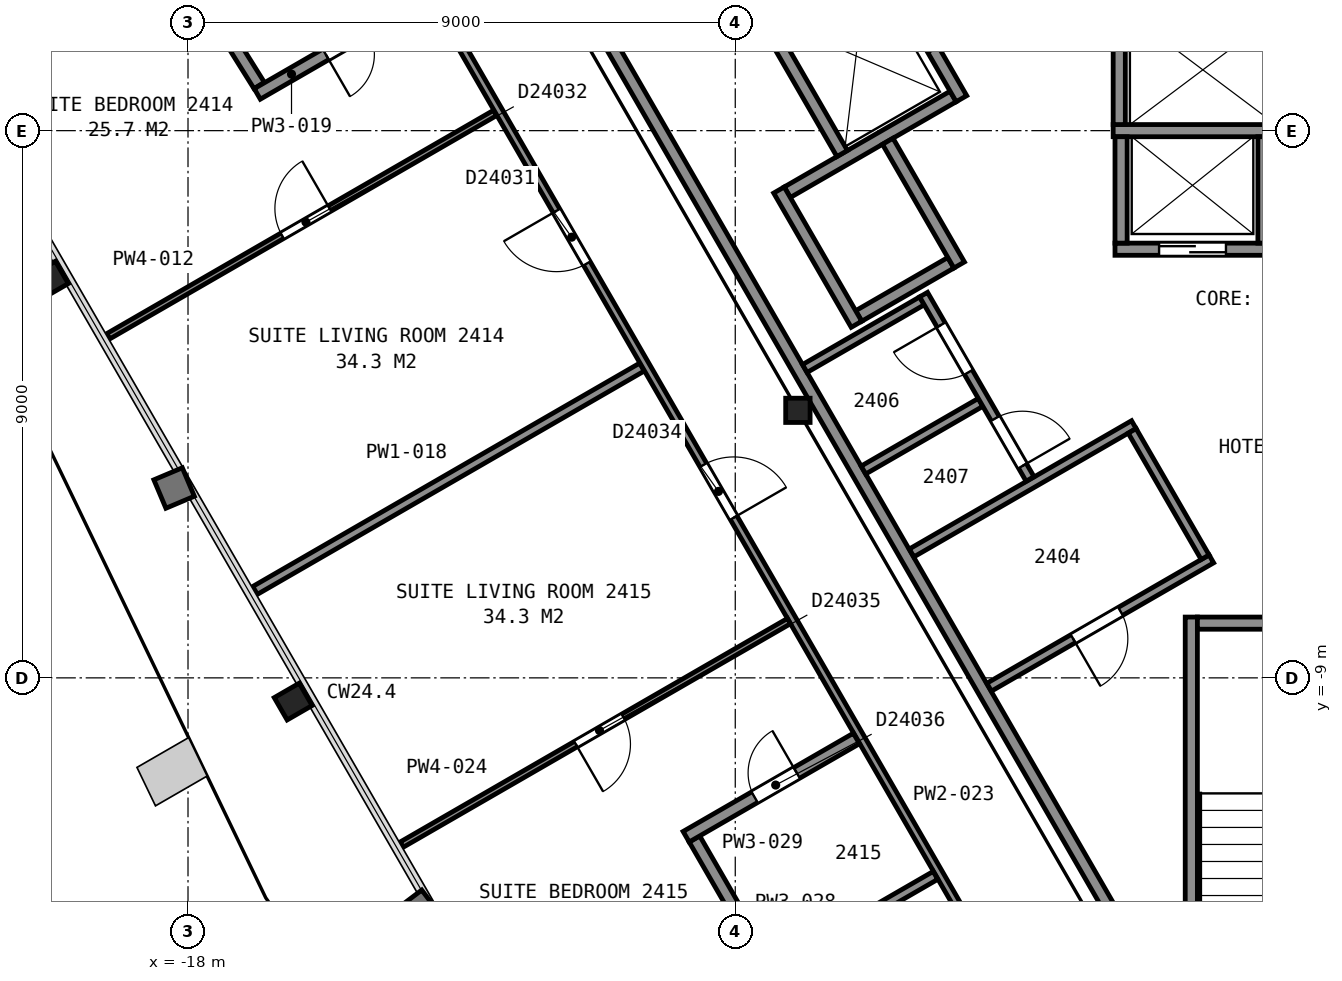
"""IFC4 building model, lengths in metres.
Left out: names, types, materials, properties, quantities, classifications, styles, units other than length and angle.
Written with IfcOpenShell. Run it as: python <this file> out.ifc"""

import sys

from ifc_helpers import new_model, si_unit, direction, frame, frame_2d, origin, origin_2d, place, context, subcontext, project, spatial, rectangle, i_section, extrude, element, fill, save


model = new_model("IFC4")
c1 = context("Model", 3, precision=1e-05, world=origin(), true_north=direction((0.0, 1.0)))
c2 = subcontext(c1, "Body", "Model", "MODEL_VIEW")
j1 = project(units=[si_unit("LENGTHUNIT", "METRE"), si_unit("PLANEANGLEUNIT", "RADIAN")], contexts=[c1])
p1 = place(None, origin())
s1 = spatial("IfcSite", under=j1, at=p1, CompositionType="ELEMENT")
p2 = place(p1, origin())
s2 = spatial("IfcBuilding", under=s1, at=p2, CompositionType="ELEMENT")
p3 = place(p2, frame((0.0, 0.0, 103.6)))
s3 = spatial("IfcBuildingStorey", under=s2, at=p3, CompositionType="ELEMENT", Elevation=103.6)
p4 = place(p3, frame((-20.28, -2.45, 0.04), z_axis=(0.0, 0.0, 1.0), x_axis=(-0.5, 0.866025403784, 0.0)))
e1 = element("IfcColumn", 1, at=p4, inside=s3, PredefinedType="COLUMN", context=c2, shape_type="SweptSolid", body=[
    extrude(i_section(OverallWidth=0.424, OverallDepth=0.475, WebThickness=0.048, FlangeThickness=0.077, FilletRadius=0.015, at=origin_2d()), origin(), (0.0, 0.0, 1.0), 3.56),
])
p5 = place(p3, frame((-16.27, -9.39, 0.035), z_axis=(0.0, 0.0, 1.0), x_axis=(-0.5, 0.866025403784, 0.0)))
e2 = element("IfcColumn", 2, at=p5, inside=s3, PredefinedType="COLUMN", context=c2, shape_type="SweptSolid", body=[
    extrude(i_section(OverallWidth=0.424, OverallDepth=0.475, WebThickness=0.048, FlangeThickness=0.077, FilletRadius=0.015, at=origin_2d()), origin(), (0.0, 0.0, 1.0), 3.565),
])
p6 = place(p3, frame((-7.97, -4.6, 0.0), z_axis=(0.0, 0.0, 1.0), x_axis=(1.0, 0.0, 0.0)))
e3 = element("IfcColumn", 3, at=p6, inside=s3, PredefinedType="COLUMN", context=c2, shape_type="SweptSolid", body=[
    extrude(i_section(OverallWidth=0.401, OverallDepth=0.399, WebThickness=0.025, FlangeThickness=0.04, FilletRadius=0.015, at=origin_2d()), origin(), (0.0, 0.0, 1.0), 3.6),
])
p7 = place(p3, frame((-1.5, -8.0, 0.0), z_axis=(0.0, 0.0, 1.0), x_axis=(0.0, -1.0, 0.0)))
e4 = element("IfcWall", 4, at=p7, inside=s3, PredefinedType="PARTITIONING", context=c2, shape_type="SweptSolid", body=[
    extrude(rectangle(XDim=12.0, YDim=0.2, at=frame_2d((6.0, 0.0))), origin(), (0.0, 0.0, 1.0), 3.35),
])
p8 = place(p3, frame((-1.4, -8.1, 0.0), z_axis=(0.0, 0.0, 1.0), x_axis=(1.0, 0.0, 0.0)))
e5 = element("IfcWall", 5, at=p8, inside=s3, PredefinedType="PARTITIONING", context=c2, shape_type="SweptSolid", body=[
    extrude(rectangle(XDim=2.8, YDim=0.2, at=frame_2d((1.4, 0.0))), origin(), (0.0, 0.0, 1.0), 3.35),
])
p9 = place(p3, frame((-2.755, -1.95, 0.0), z_axis=(0.0, 0.0, 1.0), x_axis=(1.0, 0.0, 0.0)))
e6 = element("IfcWall", 6, at=p9, inside=s3, PredefinedType="PARTITIONING", context=c2, shape_type="SweptSolid", body=[
    extrude(rectangle(XDim=2.55, YDim=0.2, at=frame_2d((1.275, 0.0))), origin(), (0.0, 0.0, 1.0), 3.6),
])
p10 = place(p9, frame((0.725, 0.0, 0.0)))
e7 = element("IfcOpeningElement", 7, at=p10, cuts=e6, PredefinedType="OPENING", context=c2, shape_type="SweptSolid", body=[
    extrude(rectangle(XDim=1.1, YDim=2.1, at=frame_2d((0.55, 1.05))), frame((0.0, 0.11, 0.0), z_axis=(0.0, -1.0, 0.0), x_axis=(1.0, 0.0, 0.0)), (0.0, 0.0, 1.0), 0.22),
])
p11 = place(p3, frame((-2.785, 0.0, 0.0), z_axis=(0.0, 0.0, 1.0), x_axis=(1.0, 0.0, 0.0)))
e8 = element("IfcWall", 8, at=p11, inside=s3, PredefinedType="PARTITIONING", context=c2, shape_type="SweptSolid", body=[
    extrude(rectangle(XDim=2.95, YDim=0.2, at=frame_2d((1.475, 0.0))), origin(), (0.0, 0.0, 1.0), 3.6),
])
p12 = place(p3, frame((-6.97, -3.048, 0.0), z_axis=(0.0, 0.0, 1.0), x_axis=(0.866036909293, 0.499980071345, 0.0)))
e9 = element("IfcWall", 9, at=p12, inside=s3, PredefinedType="PARTITIONING", context=c2, shape_type="SweptSolid", body=[
    extrude(rectangle(XDim=1.75, YDim=0.2, at=frame_2d((0.875, 0.0))), origin(), (0.0, 0.0, 1.0), 3.6),
])
p13 = place(p3, frame((-8.145, -1.013, 0.0), z_axis=(0.0, 0.0, 1.0), x_axis=(0.866016494683, 0.500015430699, 0.0)))
e10 = element("IfcWall", 10, at=p13, inside=s3, PredefinedType="PARTITIONING", context=c2, shape_type="SweptSolid", body=[
    extrude(rectangle(XDim=3.15, YDim=0.2, at=frame_2d((1.575, 0.0))), origin(), (0.0, 0.0, 1.0), 3.6),
])
for number, where, z_axis, x_axis in (
    (11, (-0.305, -1.85, 0.0), (0.0, 0.0, 1.0), (0.0, 1.0, 0.0)),
    (12, (-2.655, -1.85, 0.0), (0.0, 0.0, 1.0), (0.0, 1.0, 0.0)),
):
    element("IfcWall", number, at=place(p3, frame(where, z_axis=z_axis, x_axis=x_axis)), inside=s3, PredefinedType="PARTITIONING", context=c2, shape_type="SweptSolid", body=[
        extrude(rectangle(XDim=1.75, YDim=0.2, at=frame_2d((0.875, 0.0))), origin(), (0.0, 0.0, 1.0), 3.6),
    ])
p14 = place(p3, frame((-2.685, 0.1, 0.0), z_axis=(0.0, 0.0, 1.0), x_axis=(0.0, 1.0, 0.0)))
e13 = element("IfcWall", 13, at=p14, inside=s3, PredefinedType="PARTITIONING", context=c2, shape_type="SweptSolid", body=[
    extrude(rectangle(XDim=1.95, YDim=0.2, at=frame_2d((0.975, 0.0))), origin(), (0.0, 0.0, 1.0), 3.6),
])
p15 = place(p3, frame((-5.28, 0.525, 0.0), z_axis=(0.0, 0.0, 1.0), x_axis=(-0.500037662692, 0.866003658127, 0.0)))
e14 = element("IfcWall", 14, at=p15, inside=s3, PredefinedType="PARTITIONING", context=c2, shape_type="SweptSolid", body=[
    extrude(rectangle(XDim=2.95, YDim=0.2, at=frame_2d((1.475, 0.0))), origin(), (0.0, 0.0, 1.0), 3.6),
])
p16 = place(p15, frame((0.925, 0.0, 0.0)))
e15 = element("IfcOpeningElement", 15, at=p16, cuts=e14, PredefinedType="OPENING", context=c2, shape_type="SweptSolid", body=[
    extrude(rectangle(XDim=1.1, YDim=2.1, at=frame_2d((0.55, 1.05))), frame((0.0, 0.11, 0.0), z_axis=(0.0, -1.0, 0.0), x_axis=(1.0, 0.0, 0.0)), (0.0, 0.0, 1.0), 0.22),
])
p17 = place(p3, frame((-5.318, -2.21, 0.0), z_axis=(0.0, 0.0, 1.0), x_axis=(-0.499938297808, 0.866061024631, 0.0)))
e16 = element("IfcWall", 16, at=p17, inside=s3, PredefinedType="PARTITIONING", context=c2, shape_type="SweptSolid", body=[
    extrude(rectangle(XDim=2.35, YDim=0.2, at=frame_2d((1.175, 0.0))), origin(), (0.0, 0.0, 1.0), 3.6),
])
p18 = place(p3, frame((-7.242, -0.376, 0.0), z_axis=(0.0, 0.0, 1.0), x_axis=(-0.499996545922, 0.866027397988, 0.0)))
e17 = element("IfcWall", 17, at=p18, inside=s3, PredefinedType="PARTITIONING", context=c2, shape_type="SweptSolid", body=[
    extrude(rectangle(XDim=2.75, YDim=0.2, at=frame_2d((1.375, 0.0))), origin(), (0.0, 0.0, 1.0), 3.6),
])
p19 = place(p3, frame((-7.006, -3.185, 0.0), z_axis=(0.0, 0.0, 1.0), x_axis=(-0.499990435942, 0.866030925526, 0.0)))
e18 = element("IfcWall", 18, at=p19, inside=s3, PredefinedType="PARTITIONING", context=c2, shape_type="SweptSolid", body=[
    extrude(rectangle(XDim=2.55, YDim=0.2, at=frame_2d((1.275, 0.0))), origin(), (0.0, 0.0, 1.0), 3.6),
])
p20 = place(p3, frame((-13.664, 5.946, 0.0), z_axis=(0.0, 0.0, 1.0), x_axis=(0.499994327219, -0.866028678941, 0.0)))
e19 = element("IfcWall", 19, at=p20, inside=s3, PredefinedType="PARTITIONING", context=c2, shape_type="SweptSolid", body=[
    extrude(rectangle(XDim=23.968, YDim=0.2, at=frame_2d((11.984, 0.0))), origin(), (0.0, 0.0, 1.0), 3.35),
])
p21 = place(p3, frame((-7.856, -3.912, 0.0), z_axis=(0.0, 0.0, 1.0), x_axis=(0.865971748, 0.500092923031, 0.0)))
e20 = element("IfcWall", 20, at=p21, inside=s3, PredefinedType="PARTITIONING", context=c2, shape_type="SweptSolid", body=[
    extrude(rectangle(XDim=2.225, YDim=0.15, at=frame_2d((1.112, 0.0))), origin(), (0.0, 0.0, 1.0), 3.35),
])
p22 = place(p3, frame((-6.892, -5.582, 0.0), z_axis=(0.0, 0.0, 1.0), x_axis=(0.865944298464, 0.500140452231, 0.0)))
e21 = element("IfcWall", 21, at=p22, inside=s3, PredefinedType="PARTITIONING", context=c2, shape_type="SweptSolid", body=[
    extrude(rectangle(XDim=2.224, YDim=0.15, at=frame_2d((1.112, 0.0))), origin(), (0.0, 0.0, 1.0), 3.35),
])
p23 = place(p3, frame((-6.1, -6.946, 0.0), z_axis=(0.0, 0.0, 1.0), x_axis=(0.866038200431, 0.499977834903, 0.0)))
e22 = element("IfcWall", 22, at=p23, inside=s3, PredefinedType="PARTITIONING", context=c2, shape_type="SweptSolid", body=[
    extrude(rectangle(XDim=4.22, YDim=0.15, at=frame_2d((2.11, 0.0))), origin(), (0.0, 0.0, 1.0), 3.35),
])
p24 = place(p3, frame((-4.152, -5.729, 0.0), z_axis=(0.0, 0.0, 1.0), x_axis=(-0.500024287448, 0.866011380966, 0.0)))
e23 = element("IfcWall", 23, at=p24, inside=s3, PredefinedType="PARTITIONING", context=c2, shape_type="SweptSolid", body=[
    extrude(rectangle(XDim=3.501, YDim=0.15, at=frame_2d((1.75, 0.0))), origin(), (0.0, 0.0, 1.0), 3.35),
])
p25 = place(p24, frame((2.026, 0.0, 0.0)))
e24 = element("IfcOpeningElement", 24, at=p25, cuts=e23, PredefinedType="OPENING", context=c2, shape_type="SweptSolid", body=[
    extrude(rectangle(XDim=0.9, YDim=2.1, at=frame_2d((0.45, 1.05))), frame((0.0, 0.085, 0.0), z_axis=(0.0, -1.0, 0.0), x_axis=(1.0, 0.0, 0.0)), (0.0, 0.0, 1.0), 0.17),
])
p26 = place(p24, frame((0.248, 0.0, 0.0)))
e25 = element("IfcOpeningElement", 25, at=p26, cuts=e23, PredefinedType="OPENING", context=c2, shape_type="SweptSolid", body=[
    extrude(rectangle(XDim=0.9, YDim=2.1, at=frame_2d((0.45, 1.05))), frame((0.0, 0.085, 0.0), z_axis=(0.0, -1.0, 0.0), x_axis=(1.0, 0.0, 0.0)), (0.0, 0.0, 1.0), 0.17),
])
p27 = place(p3, frame((-4.825, -9.154, 0.0), z_axis=(0.0, 0.0, 1.0), x_axis=(0.866023738697, 0.500002884005, 0.0)))
e26 = element("IfcWall", 26, at=p27, inside=s3, PredefinedType="PARTITIONING", context=c2, shape_type="SweptSolid", body=[
    extrude(rectangle(XDim=4.22, YDim=0.15, at=frame_2d((2.11, 0.0))), origin(), (0.0, 0.0, 1.0), 3.35),
])
p28 = place(p27, frame((1.595, 0.0, 0.0)))
e27 = element("IfcOpeningElement", 27, at=p28, cuts=e26, PredefinedType="OPENING", context=c2, shape_type="SweptSolid", body=[
    extrude(rectangle(XDim=0.9, YDim=2.1, at=frame_2d((0.45, 1.05))), frame((0.0, 0.085, 0.0), z_axis=(0.0, -1.0, 0.0), x_axis=(1.0, 0.0, 0.0)), (0.0, 0.0, 1.0), 0.17),
])
p29 = place(p3, frame((-2.472, -4.938, 0.0), z_axis=(0.0, 0.0, 1.0), x_axis=(0.500045362686, -0.865999212041, 0.0)))
e28 = element("IfcWall", 28, at=p29, inside=s3, PredefinedType="PARTITIONING", context=c2, shape_type="SweptSolid", body=[
    extrude(rectangle(XDim=2.4, YDim=0.15, at=frame_2d((1.2, 0.0))), origin(), (0.0, 0.0, 1.0), 3.35),
])
p30 = place(p3, frame((-21.725, 0.798, 0.0), z_axis=(0.0, 0.0, 1.0), x_axis=(0.866003534372, 0.50003787702, 0.0)))
e29 = element("IfcWall", 29, at=p30, inside=s3, PredefinedType="PARTITIONING", context=c2, shape_type="SweptSolid", body=[
    extrude(rectangle(XDim=7.348, YDim=0.15, at=frame_2d((3.674, 0.0))), origin(), (0.0, 0.0, 1.0), 2.613),
])
p31 = place(p3, frame((-19.311, -3.382, 0.0), z_axis=(0.0, 0.0, 1.0), x_axis=(0.865995225926, 0.500052265941, 0.0)))
e30 = element("IfcWall", 30, at=p31, inside=s3, PredefinedType="PARTITIONING", context=c2, shape_type="SweptSolid", body=[
    extrude(rectangle(XDim=7.347, YDim=0.1, at=frame_2d((3.674, 0.0))), origin(), (0.0, 0.0, 1.0), 2.613),
])
p32 = place(p31, frame((3.303, 0.0, 0.0)))
e31 = element("IfcOpeningElement", 31, at=p32, cuts=e30, PredefinedType="OPENING", context=c2, shape_type="SweptSolid", body=[
    extrude(rectangle(XDim=0.9, YDim=2.1, at=frame_2d((0.45, 1.05))), frame((0.0, 0.06, 0.0), z_axis=(0.0, -1.0, 0.0), x_axis=(1.0, 0.0, 0.0)), (0.0, 0.0, 1.0), 0.12),
])
p33 = place(p3, frame((-18.112, 2.793, 0.0), z_axis=(0.0, 0.0, 1.0), x_axis=(0.530334606404, -0.847788420097, 0.0)))
e32 = element("IfcWall", 32, at=p33, inside=s3, PredefinedType="PARTITIONING", context=c2, shape_type="SweptSolid", body=[
    extrude(rectangle(XDim=2.419, YDim=0.2, at=frame_2d((1.209, 0.0))), origin(), (0.0, 0.0, 1.0), 2.613),
])
p34 = place(p3, frame((-16.898, -7.562, 0.0), z_axis=(0.0, 0.0, 1.0), x_axis=(0.866055004685, 0.499948726231, 0.0)))
e33 = element("IfcWall", 33, at=p34, inside=s3, PredefinedType="PARTITIONING", context=c2, shape_type="SweptSolid", body=[
    extrude(rectangle(XDim=7.347, YDim=0.15, at=frame_2d((3.674, 0.0))), origin(), (0.0, 0.0, 1.0), 2.613),
])
p35 = place(p3, frame((-16.861, 0.604, 0.0), z_axis=(0.0, 0.0, 1.0), x_axis=(0.866003189247, 0.500038474733, 0.0)))
e34 = element("IfcWall", 34, at=p35, inside=s3, PredefinedType="PARTITIONING", context=c2, shape_type="SweptSolid", body=[
    extrude(rectangle(XDim=3.232, YDim=0.2, at=frame_2d((1.616, 0.0))), origin(), (0.0, 0.0, 1.0), 2.613),
])
p36 = place(p35, frame((1.3, 0.0, 0.0)))
e35 = element("IfcOpeningElement", 35, at=p36, cuts=e34, PredefinedType="OPENING", context=c2, shape_type="SweptSolid", body=[
    extrude(rectangle(XDim=0.8, YDim=2.1, at=frame_2d((0.4, 1.05))), frame((0.0, 0.11, 0.0), z_axis=(0.0, -1.0, 0.0), x_axis=(1.0, 0.0, 0.0)), (0.0, 0.0, 1.0), 0.22),
])
p37 = place(p3, frame((-3.756, -15.494, 0.0), z_axis=(0.0, 0.0, 1.0), x_axis=(-0.500027787016, 0.866009360349, 0.0)))
e36 = element("IfcWall", 36, at=p37, inside=s3, PredefinedType="PARTITIONING", context=c2, shape_type="SweptSolid", body=[
    extrude(rectangle(XDim=23.856, YDim=0.125, at=frame_2d((11.928, 0.0))), origin(), (0.0, 0.0, 1.0), 2.613),
])
p38 = place(p37, frame((15.368, 0.0, 0.0)))
e37 = element("IfcOpeningElement", 37, at=p38, cuts=e36, PredefinedType="OPENING", context=c2, shape_type="SweptSolid", body=[
    extrude(rectangle(XDim=1.0, YDim=2.1, at=frame_2d((0.5, 1.05))), frame((0.0, 0.073, 0.0), z_axis=(0.0, -1.0, 0.0), x_axis=(1.0, 0.0, 0.0)), (0.0, 0.0, 1.0), 0.145),
])
p39 = place(p37, frame((10.54, 0.0, 0.0)))
e38 = element("IfcOpeningElement", 38, at=p39, cuts=e36, PredefinedType="OPENING", context=c2, shape_type="SweptSolid", body=[
    extrude(rectangle(XDim=1.0, YDim=2.1, at=frame_2d((0.5, 1.05))), frame((0.0, 0.073, 0.0), z_axis=(0.0, -1.0, 0.0), x_axis=(1.0, 0.0, 0.0)), (0.0, 0.0, 1.0), 0.145),
])
p40 = place(p3, frame((-8.117, -8.066, 0.0), z_axis=(0.0, 0.0, 1.0), x_axis=(-0.866052324842, -0.499953368461, 0.0)))
e39 = element("IfcWall", 39, at=p40, inside=s3, PredefinedType="PARTITIONING", context=c2, shape_type="SweptSolid", body=[
    extrude(rectangle(XDim=7.352, YDim=0.1, at=frame_2d((3.676, 0.0))), origin(), (0.0, 0.0, 1.0), 2.613),
])
p41 = place(p40, frame((3.148, 0.0, 0.0)))
e40 = element("IfcOpeningElement", 40, at=p41, cuts=e39, PredefinedType="OPENING", context=c2, shape_type="SweptSolid", body=[
    extrude(rectangle(XDim=0.9, YDim=2.1, at=frame_2d((0.45, 1.05))), frame((0.0, 0.06, 0.0), z_axis=(0.0, -1.0, 0.0), x_axis=(1.0, 0.0, 0.0)), (0.0, 0.0, 1.0), 0.12),
])
p42 = place(p3, frame((-12.071, -15.922, 0.0), z_axis=(0.0, 0.0, 1.0), x_axis=(0.866063309627, 0.499934339407, 0.0)))
e41 = element("IfcWall", 41, at=p42, inside=s3, PredefinedType="PARTITIONING", context=c2, shape_type="SweptSolid", body=[
    extrude(rectangle(XDim=7.348, YDim=0.15, at=frame_2d((3.674, 0.0))), origin(), (0.0, 0.0, 1.0), 2.613),
])
p43 = place(p3, frame((-9.671, -11.65, 0.0), z_axis=(0.0, 0.0, 1.0), x_axis=(0.50002218001, -0.866012597771, 0.0)))
e42 = element("IfcWall", 42, at=p43, inside=s3, PredefinedType="PARTITIONING", context=c2, shape_type="SweptSolid", body=[
    extrude(rectangle(XDim=2.421, YDim=0.2, at=frame_2d((1.21, 0.0))), origin(), (0.0, 0.0, 1.0), 2.613),
])
p44 = place(p3, frame((-7.008, -9.997, 0.0), z_axis=(0.0, 0.0, 1.0), x_axis=(-0.866078705744, -0.499907666931, 0.0)))
e43 = element("IfcWall", 43, at=p44, inside=s3, PredefinedType="PARTITIONING", context=c2, shape_type="SweptSolid", body=[
    extrude(rectangle(XDim=3.233, YDim=0.2, at=frame_2d((1.616, 0.0))), origin(), (0.0, 0.0, 1.0), 2.613),
])
p45 = place(p44, frame((1.133, 0.0, 0.0)))
e44 = element("IfcOpeningElement", 44, at=p45, cuts=e43, PredefinedType="OPENING", context=c2, shape_type="SweptSolid", body=[
    extrude(rectangle(XDim=0.8, YDim=2.1, at=frame_2d((0.4, 1.05))), frame((0.0, 0.11, 0.0), z_axis=(0.0, -1.0, 0.0), x_axis=(1.0, 0.0, 0.0)), (0.0, 0.0, 1.0), 0.22),
])
p46 = place(p10, origin())
e45 = element("IfcDoor", 45, at=p46, inside=s3, OperationType="SLIDING_TO_RIGHT", PredefinedType="DOOR", context=c2, shape_type="SweptSolid", body=[
    extrude(rectangle(XDim=1.1, YDim=2.1, at=frame_2d((0.55, 1.05))), frame((0.0, 0.025, 0.0), z_axis=(0.0, -1.0, 0.0), x_axis=(1.0, 0.0, 0.0)), (0.0, 0.0, 1.0), 0.05),
])
fill(e7, e45)
p47 = place(p25, origin())
e46 = element("IfcDoor", 46, at=p47, inside=s3, OperationType="SINGLE_SWING_RIGHT", PredefinedType="DOOR", context=c2, shape_type="SweptSolid", body=[
    extrude(rectangle(XDim=0.9, YDim=2.1, at=frame_2d((0.45, 1.05))), frame((0.0, 0.025, 0.0), z_axis=(0.0, -1.0, 0.0), x_axis=(1.0, 0.0, 0.0)), (0.0, 0.0, 1.0), 0.05),
])
fill(e24, e46)
p48 = place(p26, origin())
e47 = element("IfcDoor", 47, at=p48, inside=s3, OperationType="SINGLE_SWING_LEFT", PredefinedType="DOOR", context=c2, shape_type="SweptSolid", body=[
    extrude(rectangle(XDim=0.9, YDim=2.1, at=frame_2d((0.45, 1.05))), frame((0.0, 0.025, 0.0), z_axis=(0.0, -1.0, 0.0), x_axis=(1.0, 0.0, 0.0)), (0.0, 0.0, 1.0), 0.05),
])
fill(e25, e47)
p49 = place(p28, origin())
e48 = element("IfcDoor", 48, at=p49, inside=s3, OperationType="SINGLE_SWING_LEFT", PredefinedType="DOOR", context=c2, shape_type="SweptSolid", body=[
    extrude(rectangle(XDim=0.9, YDim=2.1, at=frame_2d((0.45, 1.05))), frame((0.0, 0.025, 0.0), z_axis=(0.0, -1.0, 0.0), x_axis=(1.0, 0.0, 0.0)), (0.0, 0.0, 1.0), 0.05),
])
fill(e27, e48)
p50 = place(p32, origin())
e49 = element("IfcDoor", 49, at=p50, inside=s3, OperationType="SINGLE_SWING_RIGHT", PredefinedType="DOOR", context=c2, shape_type="SweptSolid", body=[
    extrude(rectangle(XDim=0.9, YDim=2.1, at=frame_2d((0.45, 1.05))), frame((0.0, 0.025, 0.0), z_axis=(0.0, -1.0, 0.0), x_axis=(1.0, 0.0, 0.0)), (0.0, 0.0, 1.0), 0.05),
])
fill(e31, e49)
p51 = place(p36, origin())
e50 = element("IfcDoor", 50, at=p51, inside=s3, OperationType="SINGLE_SWING_LEFT", PredefinedType="DOOR", context=c2, shape_type="SweptSolid", body=[
    extrude(rectangle(XDim=0.8, YDim=2.1, at=frame_2d((0.4, 1.05))), frame((0.0, 0.025, 0.0), z_axis=(0.0, -1.0, 0.0), x_axis=(1.0, 0.0, 0.0)), (0.0, 0.0, 1.0), 0.05),
])
fill(e35, e50)
p52 = place(p38, origin())
e51 = element("IfcDoor", 51, at=p52, inside=s3, OperationType="SINGLE_SWING_RIGHT", PredefinedType="DOOR", context=c2, shape_type="SweptSolid", body=[
    extrude(rectangle(XDim=1.0, YDim=2.1, at=frame_2d((0.5, 1.05))), frame((0.0, 0.025, 0.0), z_axis=(0.0, -1.0, 0.0), x_axis=(1.0, 0.0, 0.0)), (0.0, 0.0, 1.0), 0.05),
])
fill(e37, e51)
p53 = place(p39, origin())
e52 = element("IfcDoor", 52, at=p53, inside=s3, OperationType="SINGLE_SWING_LEFT", PredefinedType="DOOR", context=c2, shape_type="SweptSolid", body=[
    extrude(rectangle(XDim=1.0, YDim=2.1, at=frame_2d((0.5, 1.05))), frame((0.0, 0.025, 0.0), z_axis=(0.0, -1.0, 0.0), x_axis=(1.0, 0.0, 0.0)), (0.0, 0.0, 1.0), 0.05),
])
fill(e38, e52)
p54 = place(p41, origin())
e53 = element("IfcDoor", 53, at=p54, inside=s3, OperationType="SINGLE_SWING_RIGHT", PredefinedType="DOOR", context=c2, shape_type="SweptSolid", body=[
    extrude(rectangle(XDim=0.9, YDim=2.1, at=frame_2d((0.45, 1.05))), frame((0.0, 0.025, 0.0), z_axis=(0.0, -1.0, 0.0), x_axis=(1.0, 0.0, 0.0)), (0.0, 0.0, 1.0), 0.05),
])
fill(e40, e53)
p55 = place(p45, origin())
e54 = element("IfcDoor", 54, at=p55, inside=s3, OperationType="SINGLE_SWING_LEFT", PredefinedType="DOOR", context=c2, shape_type="SweptSolid", body=[
    extrude(rectangle(XDim=0.8, YDim=2.1, at=frame_2d((0.4, 1.05))), frame((0.0, 0.025, 0.0), z_axis=(0.0, -1.0, 0.0), x_axis=(1.0, 0.0, 0.0)), (0.0, 0.0, 1.0), 0.05),
])
fill(e44, e54)
save(model, sys.argv[1])
